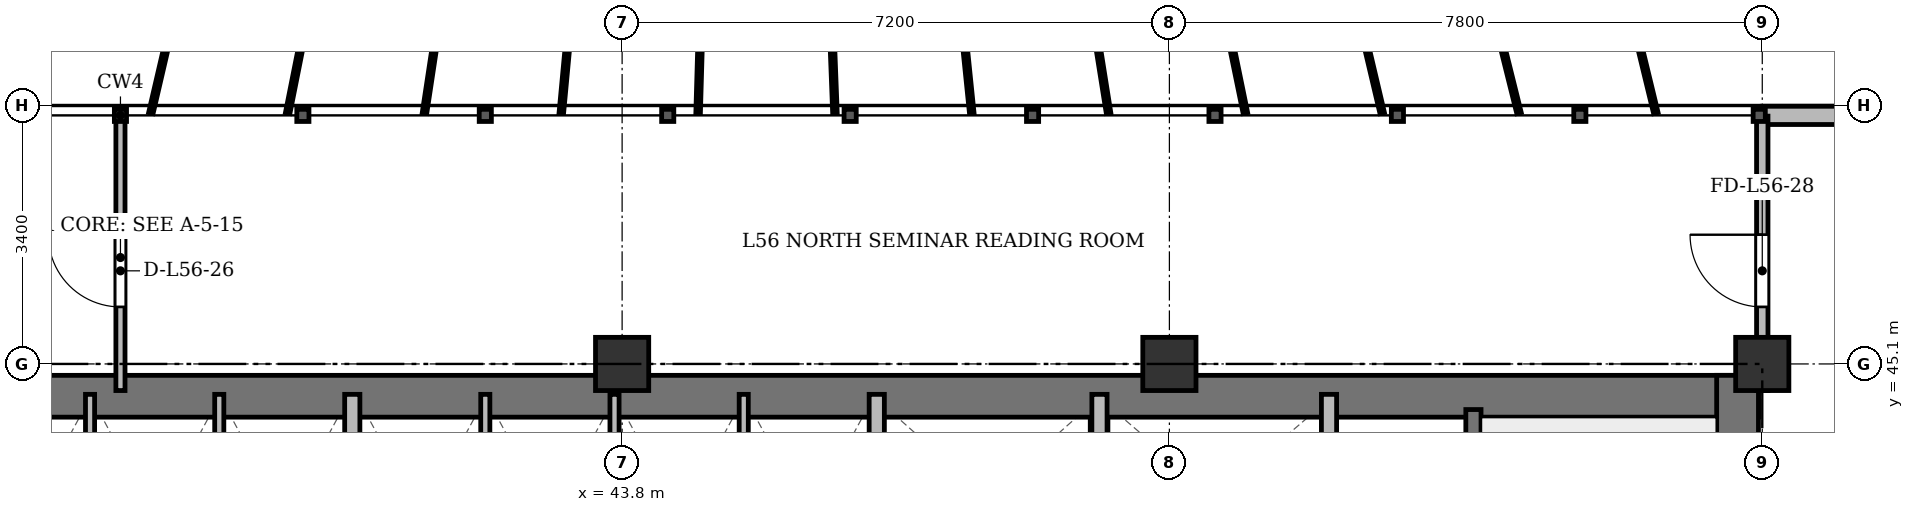
"""IFC4 building model, lengths in metres.
Left out: names, types, materials, properties, quantities, classifications, styles, units other than length and angle.
Written with IfcOpenShell. Run it as: python <this file> out.ifc"""

import sys

from ifc_helpers import new_model, si_unit, direction, frame, frame_2d, origin, origin_2d, place, context, subcontext, project, spatial, rectangle, extrude, source, transform, mapped, element, fill, save


model = new_model("IFC4")
c1 = context("Model", 3, precision=1e-05, world=origin(), true_north=direction((0.0, 1.0)))
c2 = subcontext(c1, "Body", "Model", "MODEL_VIEW")
j1 = project(units=[si_unit("LENGTHUNIT", "METRE"), si_unit("PLANEANGLEUNIT", "RADIAN")], contexts=[c1])
p1 = place(None, origin())
s1 = spatial("IfcSite", under=j1, at=p1, CompositionType="ELEMENT")
p2 = place(p1, origin())
s2 = spatial("IfcBuilding", under=s1, at=p2, CompositionType="ELEMENT")
p3 = place(p2, frame((0.0, 0.0, 215.7)))
s3 = spatial("IfcBuildingStorey", under=s2, at=p3, CompositionType="ELEMENT", Elevation=215.7)
m1 = source(origin(), c2, "Body", "SweptSolid", [
    extrude(rectangle(XDim=0.7, YDim=0.7, at=origin_2d()), origin(), (0.0, 0.0, 1.0), 3.6),
])
for number, where, z_axis, x_axis in (
    (1, (43.8, 45.1, 0.0), (0.0, 0.0, 1.0), (1.0, 0.0, 0.0)),
    (2, (51.0, 45.1, 0.0), (0.0, 0.0, 1.0), (1.0, 0.0, 0.0)),
    (3, (58.8, 45.1, 0.0), (0.0, 0.0, 1.0), (1.0, 0.0, 0.0)),
):
    element("IfcColumn", number, at=place(p3, frame(where, z_axis=z_axis, x_axis=x_axis)), inside=s3, PredefinedType="COLUMN", context=c2, shape_type="MappedRepresentation", body=[
        mapped(m1, transform((0.0, 0.0, 0.0), x_axis=(1.0, 0.0, 0.0), y_axis=(0.0, 1.0, 0.0), z_axis=(0.0, 0.0, 1.0), scale=1.0)),
    ])
p4 = place(p3, frame((58.8, 48.37, 0.0), z_axis=(0.0, 0.0, 1.0), x_axis=(1.0, 0.0, 0.0)))
e4 = element("IfcWall", 4, at=p4, inside=s3, PredefinedType="SOLIDWALL", context=c2, shape_type="SweptSolid", body=[
    extrude(rectangle(XDim=4.5, YDim=0.24, at=frame_2d((2.25, 0.0))), origin(), (0.0, 0.0, 1.0), 3.36),
])
p5 = place(p4, frame((1.65, 0.0, 0.9)))
e5 = element("IfcOpeningElement", 5, at=p5, cuts=e4, PredefinedType="OPENING", context=c2, shape_type="SweptSolid", body=[
    extrude(rectangle(XDim=1.2, YDim=1.65, at=frame_2d((0.6, 0.825))), frame((0.0, 0.13, 0.0), z_axis=(0.0, -1.0, 0.0), x_axis=(1.0, 0.0, 0.0)), (0.0, 0.0, 1.0), 0.26),
])
p6 = place(p3, frame((15.65, 44.675, 0.0), z_axis=(0.0, 0.0, 1.0), x_axis=(1.0, 0.0, 0.0)))
e6 = element("IfcWall", 6, at=p6, inside=s3, PredefinedType="SHEAR", context=c2, shape_type="SweptSolid", body=[
    extrude(rectangle(XDim=43.1, YDim=0.55, at=frame_2d((21.55, 0.0))), origin(), (0.0, 0.0, 1.0), 3.36),
])
p7 = place(p3, frame((58.475, 33.4, 0.0), z_axis=(0.0, 0.0, 1.0), x_axis=(0.0, 1.0, 0.0)))
e7 = element("IfcWall", 7, at=p7, inside=s3, PredefinedType="SHEAR", context=c2, shape_type="SweptSolid", body=[
    extrude(rectangle(XDim=11.55, YDim=0.55, at=frame_2d((5.775, 0.0))), origin(), (0.0, 0.0, 1.0), 3.36),
])
p8 = place(p3, frame((55.0, 33.4, 0.0), z_axis=(0.0, 0.0, 1.0), x_axis=(0.0, 1.0, 0.0)))
e8 = element("IfcWall", 8, at=p8, inside=s3, PredefinedType="SHEAR", context=c2, shape_type="SweptSolid", body=[
    extrude(rectangle(XDim=11.1, YDim=0.2, at=frame_2d((5.55, 0.0))), origin(), (0.0, 0.0, 1.0), 3.36),
])
p9 = place(p8, frame((0.85, 0.0, 0.0)))
e9 = element("IfcOpeningElement", 9, at=p9, cuts=e8, PredefinedType="OPENING", context=c2, shape_type="SweptSolid", body=[
    extrude(rectangle(XDim=1.1, YDim=2.15, at=frame_2d((0.55, 1.075))), frame((0.0, 0.11, 0.0), z_axis=(0.0, -1.0, 0.0), x_axis=(1.0, 0.0, 0.0)), (0.0, 0.0, 1.0), 0.22),
])
for number, where, z_axis, x_axis in (
    (10, (36.8, 41.5, 0.0), (0.0, 0.0, 1.0), (0.0, 1.0, 0.0)),
    (11, (38.5, 41.5, 0.0), (0.0, 0.0, 1.0), (0.0, 1.0, 0.0)),
):
    element("IfcWall", number, at=place(p3, frame(where, z_axis=z_axis, x_axis=x_axis)), inside=s3, PredefinedType="PARTITIONING", context=c2, shape_type="SweptSolid", body=[
        extrude(rectangle(XDim=3.2, YDim=0.12, at=frame_2d((1.6, 0.0))), origin(), (0.0, 0.0, 1.0), 3.36),
    ])
p10 = place(p3, frame((40.25, 41.5, 0.0), z_axis=(0.0, 0.0, 1.0), x_axis=(0.0, 1.0, 0.0)))
e12 = element("IfcWall", 12, at=p10, inside=s3, PredefinedType="SOLIDWALL", context=c2, shape_type="SweptSolid", body=[
    extrude(rectangle(XDim=3.2, YDim=0.2, at=frame_2d((1.6, 0.0))), origin(), (0.0, 0.0, 1.0), 3.36),
])
for number, where, z_axis, x_axis in (
    (13, (42.0, 41.5, 0.0), (0.0, 0.0, 1.0), (0.0, 1.0, 0.0)),
    (14, (43.7, 41.5, 0.0), (0.0, 0.0, 1.0), (0.0, 1.0, 0.0)),
    (15, (45.4, 41.5, 0.0), (0.0, 0.0, 1.0), (0.0, 1.0, 0.0)),
):
    element("IfcWall", number, at=place(p3, frame(where, z_axis=z_axis, x_axis=x_axis)), inside=s3, PredefinedType="PARTITIONING", context=c2, shape_type="SweptSolid", body=[
        extrude(rectangle(XDim=3.2, YDim=0.12, at=frame_2d((1.6, 0.0))), origin(), (0.0, 0.0, 1.0), 3.36),
    ])
p11 = place(p3, frame((47.15, 33.4, 0.0), z_axis=(0.0, 0.0, 1.0), x_axis=(0.0, 1.0, 0.0)))
e16 = element("IfcWall", 16, at=p11, inside=s3, PredefinedType="SOLIDWALL", context=c2, shape_type="SweptSolid", body=[
    extrude(rectangle(XDim=11.3, YDim=0.2, at=frame_2d((5.65, 0.0))), origin(), (0.0, 0.0, 1.0), 2.91),
])
for number, where, z_axis, x_axis in (
    (17, (50.08, 42.05, 0.0), (0.0, 0.0, 1.0), (0.0, 1.0, 0.0)),
    (18, (53.1, 42.05, 0.0), (0.0, 0.0, 1.0), (0.0, 1.0, 0.0)),
):
    element("IfcWall", number, at=place(p3, frame(where, z_axis=z_axis, x_axis=x_axis)), inside=s3, PredefinedType="SOLIDWALL", context=c2, shape_type="SweptSolid", body=[
        extrude(rectangle(XDim=2.65, YDim=0.2, at=frame_2d((1.325, 0.0))), origin(), (0.0, 0.0, 1.0), 3.36),
    ])
p12 = place(p3, frame((37.2, 44.75, 0.0), z_axis=(0.0, 0.0, 1.0), x_axis=(0.0, 1.0, 0.0)))
e19 = element("IfcWall", 19, at=p12, inside=s3, PredefinedType="PARTITIONING", context=c2, shape_type="SweptSolid", body=[
    extrude(rectangle(XDim=3.61, YDim=0.12, at=frame_2d((1.805, 0.0))), origin(), (0.0, 0.0, 1.0), 2.91),
])
p13 = place(p12, frame((1.1, 0.0, 0.0)))
e20 = element("IfcOpeningElement", 20, at=p13, cuts=e19, PredefinedType="OPENING", context=c2, shape_type="SweptSolid", body=[
    extrude(rectangle(XDim=0.95, YDim=2.15, at=frame_2d((0.475, 1.075))), frame((0.0, 0.07, 0.0), z_axis=(0.0, -1.0, 0.0), x_axis=(1.0, 0.0, 0.0)), (0.0, 0.0, 1.0), 0.14),
])
p14 = place(p3, frame((58.8, 44.75, 0.0), z_axis=(0.0, 0.0, 1.0), x_axis=(0.0, 1.0, 0.0)))
e21 = element("IfcWall", 21, at=p14, inside=s3, PredefinedType="PARTITIONING", context=c2, shape_type="SweptSolid", body=[
    extrude(rectangle(XDim=3.61, YDim=0.15, at=frame_2d((1.805, 0.0))), origin(), (0.0, 0.0, 1.0), 2.86),
])
p15 = place(p14, frame((1.1, 0.0, 0.0)))
e22 = element("IfcOpeningElement", 22, at=p15, cuts=e21, PredefinedType="OPENING", context=c2, shape_type="SweptSolid", body=[
    extrude(rectangle(XDim=0.95, YDim=2.15, at=frame_2d((0.475, 1.075))), frame((0.0, 0.085, 0.0), z_axis=(0.0, -1.0, 0.0), x_axis=(1.0, 0.0, 0.0)), (0.0, 0.0, 1.0), 0.17),
])
m2 = source(origin(), c2, "Body", "SweptSolid", [
    extrude(rectangle(XDim=0.95, YDim=2.15, at=frame_2d((0.475, 1.075))), frame((0.0, 0.025, 0.0), z_axis=(0.0, -1.0, 0.0), x_axis=(1.0, 0.0, 0.0)), (0.0, 0.0, 1.0), 0.05),
])
p16 = place(p13, origin())
e23 = element("IfcDoor", 23, at=p16, inside=s3, OperationType="SINGLE_SWING_RIGHT", PredefinedType="DOOR", context=c2, shape_type="MappedRepresentation", body=[
    mapped(m2, transform((0.0, 0.0, 0.0), x_axis=(1.0, 0.0, 0.0), y_axis=(0.0, 1.0, 0.0), z_axis=(0.0, 0.0, 1.0), scale=1.0)),
])
fill(e20, e23)
p17 = place(p15, origin())
e24 = element("IfcDoor", 24, at=p17, inside=s3, OperationType="SINGLE_SWING_RIGHT", PredefinedType="DOOR", context=c2, shape_type="MappedRepresentation", body=[
    mapped(m2, transform((0.0, 0.0, 0.0), x_axis=(1.0, 0.0, 0.0), y_axis=(0.0, 1.0, 0.0), z_axis=(0.0, 0.0, 1.0), scale=1.0)),
])
fill(e22, e24)
save(model, sys.argv[1])
